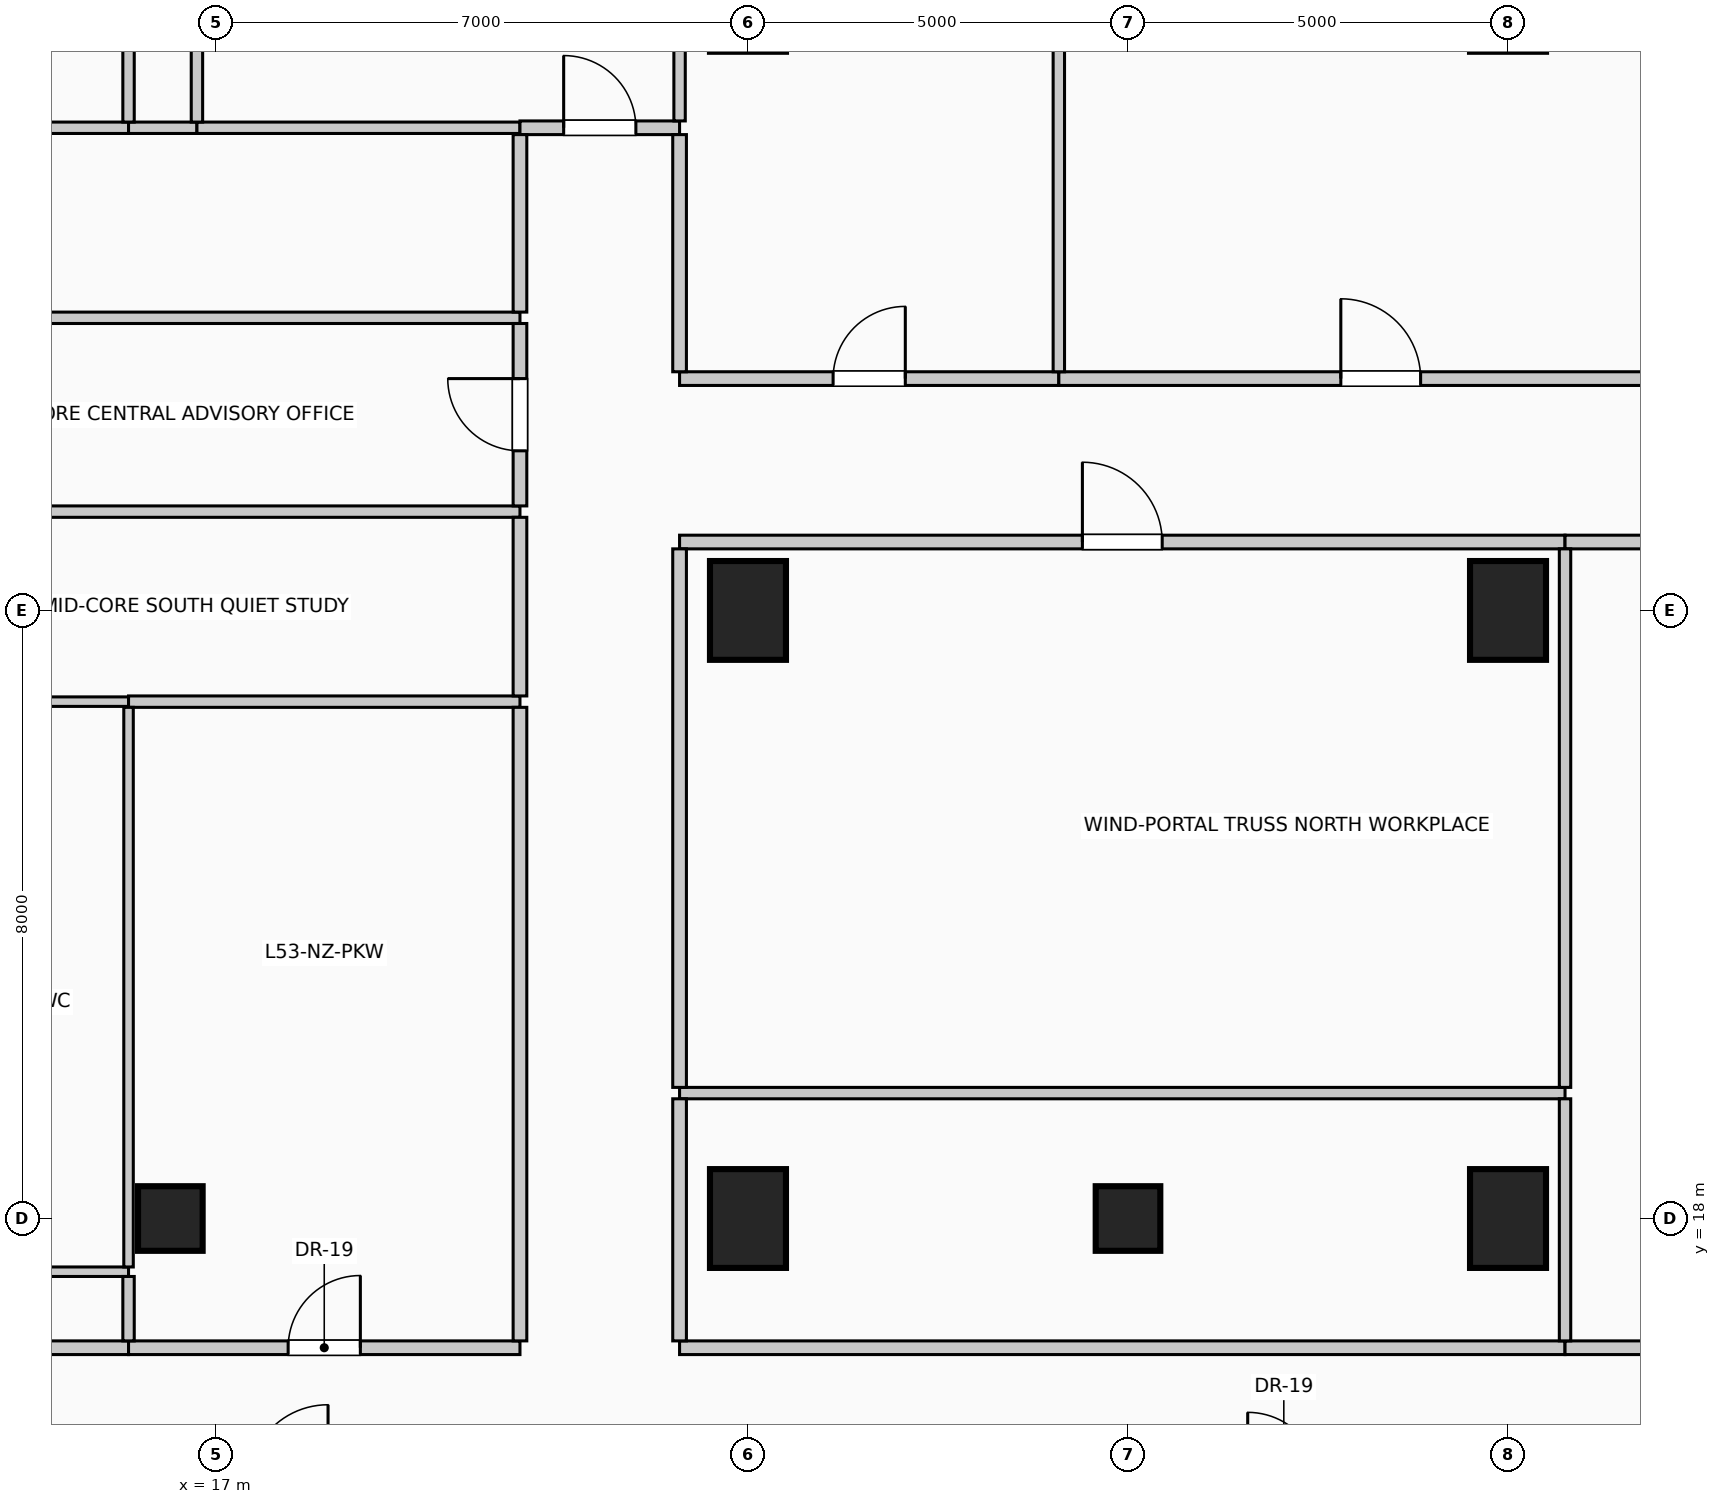
"""IFC4 building model, lengths in metres.
Left out: names, types, materials, properties, quantities, classifications, styles, units other than length and angle.
Written with IfcOpenShell. Run it as: python <this file> out.ifc"""

import sys

from ifc_helpers import new_model, si_unit, direction, frame, frame_2d, origin, origin_2d, place, context, subcontext, project, spatial, rectangle, circle, extrude, element, fill, save


model = new_model("IFC4")
c1 = context("Model", 3, precision=1e-05, world=origin(), true_north=direction((0.0, 1.0)))
c2 = subcontext(c1, "Body", "Model", "MODEL_VIEW")
j1 = project(units=[si_unit("LENGTHUNIT", "METRE"), si_unit("PLANEANGLEUNIT", "RADIAN")], contexts=[c1])
p1 = place(None, origin())
s1 = spatial("IfcSite", under=j1, at=p1, CompositionType="ELEMENT")
p2 = place(p1, origin())
s2 = spatial("IfcBuilding", under=s1, at=p2, CompositionType="ELEMENT")
p3 = place(p2, frame((0.0, 0.0, 218.6)))
s3 = spatial("IfcBuildingStorey", under=s2, at=p3, CompositionType="ELEMENT", Elevation=218.6)
for number, where, z_axis, x_axis in (
    (1, (24.0, 18.0, 0.0), (0.0, 0.0, 1.0), (1.0, 0.0, 0.0)),
    (2, (34.0, 18.0, 0.0), (0.0, 0.0, 1.0), (1.0, 0.0, 0.0)),
    (3, (24.0, 26.0, 0.0), (0.0, 0.0, 1.0), (1.0, 0.0, 0.0)),
    (4, (34.0, 26.0, 0.0), (0.0, 0.0, 1.0), (1.0, 0.0, 0.0)),
    (5, (24.0, 34.0, 0.0), (0.0, 0.0, 1.0), (1.0, 0.0, 0.0)),
    (6, (34.0, 34.0, 0.0), (0.0, 0.0, 1.0), (1.0, 0.0, 0.0)),
):
    element("IfcColumn", number, at=place(p3, frame(where, z_axis=z_axis, x_axis=x_axis)), inside=s3, PredefinedType="COLUMN", context=c2, shape_type="SweptSolid", body=[
        extrude(rectangle(XDim=1.0, YDim=1.3, at=origin_2d()), origin(), (0.0, 0.0, 1.0), 4.0),
    ])
for number, where, z_axis, x_axis in (
    (7, (16.4, 18.0, 0.0), (0.0, 0.0, 1.0), (1.0, 0.0, 0.0)),
    (8, (29.0, 18.0, 0.0), (0.0, 0.0, 1.0), (1.0, 0.0, 0.0)),
):
    element("IfcColumn", number, at=place(p3, frame(where, z_axis=z_axis, x_axis=x_axis)), inside=s3, PredefinedType="COLUMN", context=c2, shape_type="SweptSolid", body=[
        extrude(circle(Radius=0.425, at=origin_2d()), origin(), (0.0, 0.0, 1.0), 4.0),
    ])
p4 = place(p3, frame((3.55, 16.3, 0.0), z_axis=(0.0, 0.0, 1.0), x_axis=(1.0, 0.0, 0.0)))
e9 = element("IfcWall", 9, at=p4, inside=s3, PredefinedType="PARTITIONING", context=c2, shape_type="SweptSolid", body=[
    extrude(rectangle(XDim=12.3, YDim=0.18, at=frame_2d((6.15, 0.0))), origin(), (0.0, 0.0, 1.0), 3.75),
])
p5 = place(p3, frame((15.85, 16.3, 0.0), z_axis=(0.0, 0.0, 1.0), x_axis=(1.0, 0.0, 0.0)))
e10 = element("IfcWall", 10, at=p5, inside=s3, PredefinedType="PARTITIONING", context=c2, shape_type="SweptSolid", body=[
    extrude(rectangle(XDim=5.15, YDim=0.18, at=frame_2d((2.575, 0.0))), origin(), (0.0, 0.0, 1.0), 3.75),
])
p6 = place(p5, frame((2.1, 0.0, 0.0)))
e11 = element("IfcOpeningElement", 11, at=p6, cuts=e10, PredefinedType="OPENING", context=c2, shape_type="SweptSolid", body=[
    extrude(rectangle(XDim=0.95, YDim=2.15, at=frame_2d((0.475, 1.075))), frame((0.0, 0.1, 0.0), z_axis=(0.0, -1.0, 0.0), x_axis=(1.0, 0.0, 0.0)), (0.0, 0.0, 1.0), 0.2),
])
p7 = place(p3, frame((23.1, 16.3, 0.0), z_axis=(0.0, 0.0, 1.0), x_axis=(1.0, 0.0, 0.0)))
e12 = element("IfcWall", 12, at=p7, inside=s3, PredefinedType="PARTITIONING", context=c2, shape_type="SweptSolid", body=[
    extrude(rectangle(XDim=11.65, YDim=0.18, at=frame_2d((5.825, 0.0))), origin(), (0.0, 0.0, 1.0), 3.75),
])
p8 = place(p3, frame((34.75, 16.3, 0.0), z_axis=(0.0, 0.0, 1.0), x_axis=(1.0, 0.0, 0.0)))
e13 = element("IfcWall", 13, at=p8, inside=s3, PredefinedType="PARTITIONING", context=c2, shape_type="SweptSolid", body=[
    extrude(rectangle(XDim=22.53, YDim=0.18, at=frame_2d((11.265, 0.0))), origin(), (0.0, 0.0, 1.0), 3.75),
])
p9 = place(p8, frame((10.79, 0.0, 0.0)))
e14 = element("IfcOpeningElement", 14, at=p9, cuts=e13, PredefinedType="OPENING", context=c2, shape_type="SweptSolid", body=[
    extrude(rectangle(XDim=0.95, YDim=2.15, at=frame_2d((0.475, 1.075))), frame((0.0, 0.1, 0.0), z_axis=(0.0, -1.0, 0.0), x_axis=(1.0, 0.0, 0.0)), (0.0, 0.0, 1.0), 0.2),
])
p10 = place(p3, frame((9.8, 17.3, 0.0), z_axis=(0.0, 0.0, 1.0), x_axis=(1.0, 0.0, 0.0)))
e15 = element("IfcWall", 15, at=p10, inside=s3, PredefinedType="PARTITIONING", context=c2, shape_type="SweptSolid", body=[
    extrude(rectangle(XDim=6.05, YDim=0.125, at=frame_2d((3.025, 0.0))), origin(), (0.0, 0.0, 1.0), 3.75),
])
p11 = place(p3, frame((23.1, 19.65, 0.0), z_axis=(0.0, 0.0, 1.0), x_axis=(1.0, 0.0, 0.0)))
e16 = element("IfcWall", 16, at=p11, inside=s3, PredefinedType="PARTITIONING", context=c2, shape_type="SweptSolid", body=[
    extrude(rectangle(XDim=11.65, YDim=0.15, at=frame_2d((5.825, 0.0))), origin(), (0.0, 0.0, 1.0), 3.75),
])
p12 = place(p3, frame((12.2, 24.8, 0.0), z_axis=(0.0, 0.0, 1.0), x_axis=(1.0, 0.0, 0.0)))
e17 = element("IfcWall", 17, at=p12, inside=s3, PredefinedType="PARTITIONING", context=c2, shape_type="SweptSolid", body=[
    extrude(rectangle(XDim=3.65, YDim=0.125, at=frame_2d((1.825, 0.0))), origin(), (0.0, 0.0, 1.0), 3.75),
])
p13 = place(p3, frame((15.85, 24.8, 0.0), z_axis=(0.0, 0.0, 1.0), x_axis=(1.0, 0.0, 0.0)))
e18 = element("IfcWall", 18, at=p13, inside=s3, PredefinedType="PARTITIONING", context=c2, shape_type="SweptSolid", body=[
    extrude(rectangle(XDim=5.15, YDim=0.15, at=frame_2d((2.575, 0.0))), origin(), (0.0, 0.0, 1.0), 3.75),
])
p14 = place(p3, frame((23.1, 26.9, 0.0), z_axis=(0.0, 0.0, 1.0), x_axis=(1.0, 0.0, 0.0)))
e19 = element("IfcWall", 19, at=p14, inside=s3, PredefinedType="PARTITIONING", context=c2, shape_type="SweptSolid", body=[
    extrude(rectangle(XDim=11.65, YDim=0.18, at=frame_2d((5.825, 0.0))), origin(), (0.0, 0.0, 1.0), 3.75),
])
p15 = place(p14, frame((5.3, 0.0, 0.0)))
e20 = element("IfcOpeningElement", 20, at=p15, cuts=e19, PredefinedType="OPENING", context=c2, shape_type="SweptSolid", body=[
    extrude(rectangle(XDim=1.05, YDim=2.15, at=frame_2d((0.525, 1.075))), frame((0.0, 0.1, 0.0), z_axis=(0.0, -1.0, 0.0), x_axis=(1.0, 0.0, 0.0)), (0.0, 0.0, 1.0), 0.2),
])
p16 = place(p3, frame((34.75, 26.9, 0.0), z_axis=(0.0, 0.0, 1.0), x_axis=(1.0, 0.0, 0.0)))
e21 = element("IfcWall", 21, at=p16, inside=s3, PredefinedType="PARTITIONING", context=c2, shape_type="SweptSolid", body=[
    extrude(rectangle(XDim=22.53, YDim=0.18, at=frame_2d((11.265, 0.0))), origin(), (0.0, 0.0, 1.0), 3.75),
])
p17 = place(p3, frame((12.2, 27.3, 0.0), z_axis=(0.0, 0.0, 1.0), x_axis=(1.0, 0.0, 0.0)))
e22 = element("IfcWall", 22, at=p17, inside=s3, PredefinedType="PARTITIONING", context=c2, shape_type="SweptSolid", body=[
    extrude(rectangle(XDim=8.8, YDim=0.15, at=frame_2d((4.4, 0.0))), origin(), (0.0, 0.0, 1.0), 3.75),
])
p18 = place(p3, frame((23.1, 29.05, 0.0), z_axis=(0.0, 0.0, 1.0), x_axis=(1.0, 0.0, 0.0)))
e23 = element("IfcWall", 23, at=p18, inside=s3, PredefinedType="PARTITIONING", context=c2, shape_type="SweptSolid", body=[
    extrude(rectangle(XDim=4.99, YDim=0.18, at=frame_2d((2.495, 0.0))), origin(), (0.0, 0.0, 1.0), 3.75),
])
p19 = place(p18, frame((2.02, 0.0, 0.0)))
e24 = element("IfcOpeningElement", 24, at=p19, cuts=e23, PredefinedType="OPENING", context=c2, shape_type="SweptSolid", body=[
    extrude(rectangle(XDim=0.95, YDim=2.15, at=frame_2d((0.475, 1.075))), frame((0.0, 0.1, 0.0), z_axis=(0.0, -1.0, 0.0), x_axis=(1.0, 0.0, 0.0)), (0.0, 0.0, 1.0), 0.2),
])
p20 = place(p3, frame((28.09, 29.05, 0.0), z_axis=(0.0, 0.0, 1.0), x_axis=(1.0, 0.0, 0.0)))
e25 = element("IfcWall", 25, at=p20, inside=s3, PredefinedType="PARTITIONING", context=c2, shape_type="SweptSolid", body=[
    extrude(rectangle(XDim=8.47, YDim=0.18, at=frame_2d((4.235, 0.0))), origin(), (0.0, 0.0, 1.0), 3.75),
])
p21 = place(p20, frame((3.71, 0.0, 0.0)))
e26 = element("IfcOpeningElement", 26, at=p21, cuts=e25, PredefinedType="OPENING", context=c2, shape_type="SweptSolid", body=[
    extrude(rectangle(XDim=1.05, YDim=2.15, at=frame_2d((0.525, 1.075))), frame((0.0, 0.1, 0.0), z_axis=(0.0, -1.0, 0.0), x_axis=(1.0, 0.0, 0.0)), (0.0, 0.0, 1.0), 0.2),
])
p22 = place(p3, frame((12.33, 29.85, 0.0), z_axis=(0.0, 0.0, 1.0), x_axis=(1.0, 0.0, 0.0)))
e27 = element("IfcWall", 27, at=p22, inside=s3, PredefinedType="PARTITIONING", context=c2, shape_type="SweptSolid", body=[
    extrude(rectangle(XDim=8.67, YDim=0.15, at=frame_2d((4.335, 0.0))), origin(), (0.0, 0.0, 1.0), 3.75),
])
p23 = place(p3, frame((12.33, 32.35, 0.0), z_axis=(0.0, 0.0, 1.0), x_axis=(1.0, 0.0, 0.0)))
e28 = element("IfcWall", 28, at=p23, inside=s3, PredefinedType="PARTITIONING", context=c2, shape_type="SweptSolid", body=[
    extrude(rectangle(XDim=3.52, YDim=0.15, at=frame_2d((1.76, 0.0))), origin(), (0.0, 0.0, 1.0), 3.75),
])
p24 = place(p23, frame((1.235, 0.0, 0.0)))
e29 = element("IfcOpeningElement", 29, at=p24, cuts=e28, PredefinedType="OPENING", context=c2, shape_type="SweptSolid", body=[
    extrude(rectangle(XDim=1.05, YDim=2.15, at=frame_2d((0.525, 1.075))), frame((0.0, 0.085, 0.0), z_axis=(0.0, -1.0, 0.0), x_axis=(1.0, 0.0, 0.0)), (0.0, 0.0, 1.0), 0.17),
])
p25 = place(p3, frame((15.85, 32.35, 0.0), z_axis=(0.0, 0.0, 1.0), x_axis=(1.0, 0.0, 0.0)))
e30 = element("IfcWall", 30, at=p25, inside=s3, PredefinedType="PARTITIONING", context=c2, shape_type="SweptSolid", body=[
    extrude(rectangle(XDim=0.9, YDim=0.15, at=frame_2d((0.45, 0.0))), origin(), (0.0, 0.0, 1.0), 3.75),
])
p26 = place(p3, frame((16.75, 32.35, 0.0), z_axis=(0.0, 0.0, 1.0), x_axis=(1.0, 0.0, 0.0)))
e31 = element("IfcWall", 31, at=p26, inside=s3, PredefinedType="PARTITIONING", context=c2, shape_type="SweptSolid", body=[
    extrude(rectangle(XDim=4.25, YDim=0.15, at=frame_2d((2.125, 0.0))), origin(), (0.0, 0.0, 1.0), 3.75),
])
p27 = place(p3, frame((21.0, 32.35, 0.0), z_axis=(0.0, 0.0, 1.0), x_axis=(1.0, 0.0, 0.0)))
e32 = element("IfcWall", 32, at=p27, inside=s3, PredefinedType="PARTITIONING", context=c2, shape_type="SweptSolid", body=[
    extrude(rectangle(XDim=2.1, YDim=0.18, at=frame_2d((1.05, 0.0))), origin(), (0.0, 0.0, 1.0), 3.75),
])
p28 = place(p27, frame((0.575, 0.0, 0.0)))
e33 = element("IfcOpeningElement", 33, at=p28, cuts=e32, PredefinedType="OPENING", context=c2, shape_type="SweptSolid", body=[
    extrude(rectangle(XDim=0.95, YDim=2.15, at=frame_2d((0.475, 1.075))), frame((0.0, 0.1, 0.0), z_axis=(0.0, -1.0, 0.0), x_axis=(1.0, 0.0, 0.0)), (0.0, 0.0, 1.0), 0.2),
])
p29 = place(p3, frame((15.85, 16.39, 0.0), z_axis=(0.0, 0.0, 1.0), x_axis=(0.0, 1.0, 0.0)))
e34 = element("IfcWall", 34, at=p29, inside=s3, PredefinedType="PARTITIONING", context=c2, shape_type="SweptSolid", body=[
    extrude(rectangle(XDim=0.848, YDim=0.15, at=frame_2d((0.424, 0.0))), origin(), (0.0, 0.0, 1.0), 3.75),
])
p30 = place(p3, frame((15.85, 17.363, 0.0), z_axis=(0.0, 0.0, 1.0), x_axis=(0.0, 1.0, 0.0)))
e35 = element("IfcWall", 35, at=p30, inside=s3, PredefinedType="PARTITIONING", context=c2, shape_type="SweptSolid", body=[
    extrude(rectangle(XDim=7.363, YDim=0.125, at=frame_2d((3.681, 0.0))), origin(), (0.0, 0.0, 1.0), 3.75),
])
p31 = place(p3, frame((15.85, 32.425, 0.0), z_axis=(0.0, 0.0, 1.0), x_axis=(0.0, 1.0, 0.0)))
e36 = element("IfcWall", 36, at=p31, inside=s3, PredefinedType="PARTITIONING", context=c2, shape_type="SweptSolid", body=[
    extrude(rectangle(XDim=1.725, YDim=0.15, at=frame_2d((0.862, 0.0))), origin(), (0.0, 0.0, 1.0), 3.75),
])
p32 = place(p3, frame((16.75, 32.425, 0.0), z_axis=(0.0, 0.0, 1.0), x_axis=(0.0, 1.0, 0.0)))
e37 = element("IfcWall", 37, at=p32, inside=s3, PredefinedType="PARTITIONING", context=c2, shape_type="SweptSolid", body=[
    extrude(rectangle(XDim=1.15, YDim=0.15, at=frame_2d((0.575, 0.0))), origin(), (0.0, 0.0, 1.0), 3.75),
])
p33 = place(p3, frame((21.0, 16.39, 0.0), z_axis=(0.0, 0.0, 1.0), x_axis=(0.0, 1.0, 0.0)))
e38 = element("IfcWall", 38, at=p33, inside=s3, PredefinedType="PARTITIONING", context=c2, shape_type="SweptSolid", body=[
    extrude(rectangle(XDim=8.335, YDim=0.18, at=frame_2d((4.167, 0.0))), origin(), (0.0, 0.0, 1.0), 3.75),
])
p34 = place(p3, frame((21.0, 24.875, 0.0), z_axis=(0.0, 0.0, 1.0), x_axis=(0.0, 1.0, 0.0)))
e39 = element("IfcWall", 39, at=p34, inside=s3, PredefinedType="PARTITIONING", context=c2, shape_type="SweptSolid", body=[
    extrude(rectangle(XDim=2.35, YDim=0.18, at=frame_2d((1.175, 0.0))), origin(), (0.0, 0.0, 1.0), 3.75),
])
p35 = place(p3, frame((21.0, 27.375, 0.0), z_axis=(0.0, 0.0, 1.0), x_axis=(0.0, 1.0, 0.0)))
e40 = element("IfcWall", 40, at=p35, inside=s3, PredefinedType="PARTITIONING", context=c2, shape_type="SweptSolid", body=[
    extrude(rectangle(XDim=2.4, YDim=0.18, at=frame_2d((1.2, 0.0))), origin(), (0.0, 0.0, 1.0), 3.75),
])
p36 = place(p35, frame((0.725, 0.0, 0.0)))
e41 = element("IfcOpeningElement", 41, at=p36, cuts=e40, PredefinedType="OPENING", context=c2, shape_type="SweptSolid", body=[
    extrude(rectangle(XDim=0.95, YDim=2.15, at=frame_2d((0.475, 1.075))), frame((0.0, 0.1, 0.0), z_axis=(0.0, -1.0, 0.0), x_axis=(1.0, 0.0, 0.0)), (0.0, 0.0, 1.0), 0.2),
])
p37 = place(p3, frame((21.0, 29.925, 0.0), z_axis=(0.0, 0.0, 1.0), x_axis=(0.0, 1.0, 0.0)))
e42 = element("IfcWall", 42, at=p37, inside=s3, PredefinedType="PARTITIONING", context=c2, shape_type="SweptSolid", body=[
    extrude(rectangle(XDim=2.335, YDim=0.18, at=frame_2d((1.167, 0.0))), origin(), (0.0, 0.0, 1.0), 3.75),
])
p38 = place(p3, frame((23.1, 16.39, 0.0), z_axis=(0.0, 0.0, 1.0), x_axis=(0.0, 1.0, 0.0)))
e43 = element("IfcWall", 43, at=p38, inside=s3, PredefinedType="PARTITIONING", context=c2, shape_type="SweptSolid", body=[
    extrude(rectangle(XDim=3.185, YDim=0.18, at=frame_2d((1.593, 0.0))), origin(), (0.0, 0.0, 1.0), 3.75),
])
p39 = place(p3, frame((23.1, 19.725, 0.0), z_axis=(0.0, 0.0, 1.0), x_axis=(0.0, 1.0, 0.0)))
e44 = element("IfcWall", 44, at=p39, inside=s3, PredefinedType="PARTITIONING", context=c2, shape_type="SweptSolid", body=[
    extrude(rectangle(XDim=7.085, YDim=0.18, at=frame_2d((3.542, 0.0))), origin(), (0.0, 0.0, 1.0), 3.75),
])
p40 = place(p3, frame((23.1, 29.14, 0.0), z_axis=(0.0, 0.0, 1.0), x_axis=(0.0, 1.0, 0.0)))
e45 = element("IfcWall", 45, at=p40, inside=s3, PredefinedType="PARTITIONING", context=c2, shape_type="SweptSolid", body=[
    extrude(rectangle(XDim=3.12, YDim=0.18, at=frame_2d((1.56, 0.0))), origin(), (0.0, 0.0, 1.0), 3.75),
])
p41 = place(p3, frame((23.1, 32.44, 0.0), z_axis=(0.0, 0.0, 1.0), x_axis=(0.0, 1.0, 0.0)))
e46 = element("IfcWall", 46, at=p41, inside=s3, PredefinedType="PARTITIONING", context=c2, shape_type="SweptSolid", body=[
    extrude(rectangle(XDim=12.84, YDim=0.15, at=frame_2d((6.42, 0.0))), origin(), (0.0, 0.0, 1.0), 3.75),
])
p42 = place(p3, frame((28.09, 29.14, 0.0), z_axis=(0.0, 0.0, 1.0), x_axis=(0.0, 1.0, 0.0)))
e47 = element("IfcWall", 47, at=p42, inside=s3, PredefinedType="PARTITIONING", context=c2, shape_type="SweptSolid", body=[
    extrude(rectangle(XDim=16.14, YDim=0.15, at=frame_2d((8.07, 0.0))), origin(), (0.0, 0.0, 1.0), 3.75),
])
p43 = place(p3, frame((34.75, 16.39, 0.0), z_axis=(0.0, 0.0, 1.0), x_axis=(0.0, 1.0, 0.0)))
e48 = element("IfcWall", 48, at=p43, inside=s3, PredefinedType="PARTITIONING", context=c2, shape_type="SweptSolid", body=[
    extrude(rectangle(XDim=3.185, YDim=0.15, at=frame_2d((1.593, 0.0))), origin(), (0.0, 0.0, 1.0), 3.75),
])
p44 = place(p3, frame((34.75, 19.725, 0.0), z_axis=(0.0, 0.0, 1.0), x_axis=(0.0, 1.0, 0.0)))
e49 = element("IfcWall", 49, at=p44, inside=s3, PredefinedType="PARTITIONING", context=c2, shape_type="SweptSolid", body=[
    extrude(rectangle(XDim=7.085, YDim=0.15, at=frame_2d((3.542, 0.0))), origin(), (0.0, 0.0, 1.0), 3.75),
])
p45 = place(p6, origin())
e50 = element("IfcDoor", 50, at=p45, inside=s3, OperationType="SINGLE_SWING_RIGHT", PredefinedType="DOOR", context=c2, shape_type="SweptSolid", body=[
    extrude(rectangle(XDim=0.95, YDim=2.15, at=frame_2d((0.475, 1.075))), frame((0.0, 0.025, 0.0), z_axis=(0.0, -1.0, 0.0), x_axis=(1.0, 0.0, 0.0)), (0.0, 0.0, 1.0), 0.05),
])
fill(e11, e50)
p46 = place(p15, origin())
e51 = element("IfcDoor", 51, at=p46, inside=s3, OperationType="SINGLE_SWING_LEFT", PredefinedType="DOOR", context=c2, shape_type="SweptSolid", body=[
    extrude(rectangle(XDim=1.05, YDim=2.15, at=frame_2d((0.525, 1.075))), frame((0.0, 0.025, 0.0), z_axis=(0.0, -1.0, 0.0), x_axis=(1.0, 0.0, 0.0)), (0.0, 0.0, 1.0), 0.05),
])
fill(e20, e51)
p47 = place(p19, origin())
e52 = element("IfcDoor", 52, at=p47, inside=s3, OperationType="SINGLE_SWING_RIGHT", PredefinedType="DOOR", context=c2, shape_type="SweptSolid", body=[
    extrude(rectangle(XDim=0.95, YDim=2.15, at=frame_2d((0.475, 1.075))), frame((0.0, 0.025, 0.0), z_axis=(0.0, -1.0, 0.0), x_axis=(1.0, 0.0, 0.0)), (0.0, 0.0, 1.0), 0.05),
])
fill(e24, e52)
p48 = place(p21, origin())
e53 = element("IfcDoor", 53, at=p48, inside=s3, OperationType="SINGLE_SWING_LEFT", PredefinedType="DOOR", context=c2, shape_type="SweptSolid", body=[
    extrude(rectangle(XDim=1.05, YDim=2.15, at=frame_2d((0.525, 1.075))), frame((0.0, 0.025, 0.0), z_axis=(0.0, -1.0, 0.0), x_axis=(1.0, 0.0, 0.0)), (0.0, 0.0, 1.0), 0.05),
])
fill(e26, e53)
p49 = place(p28, origin())
e54 = element("IfcDoor", 54, at=p49, inside=s3, OperationType="SINGLE_SWING_LEFT", PredefinedType="DOOR", context=c2, shape_type="SweptSolid", body=[
    extrude(rectangle(XDim=0.95, YDim=2.15, at=frame_2d((0.475, 1.075))), frame((0.0, 0.025, 0.0), z_axis=(0.0, -1.0, 0.0), x_axis=(1.0, 0.0, 0.0)), (0.0, 0.0, 1.0), 0.05),
])
fill(e33, e54)
p50 = place(p36, origin())
e55 = element("IfcDoor", 55, at=p50, inside=s3, OperationType="SINGLE_SWING_RIGHT", PredefinedType="DOOR", context=c2, shape_type="SweptSolid", body=[
    extrude(rectangle(XDim=0.95, YDim=2.15, at=frame_2d((0.475, 1.075))), frame((0.0, 0.025, 0.0), z_axis=(0.0, -1.0, 0.0), x_axis=(1.0, 0.0, 0.0)), (0.0, 0.0, 1.0), 0.05),
])
fill(e41, e55)
save(model, sys.argv[1])
